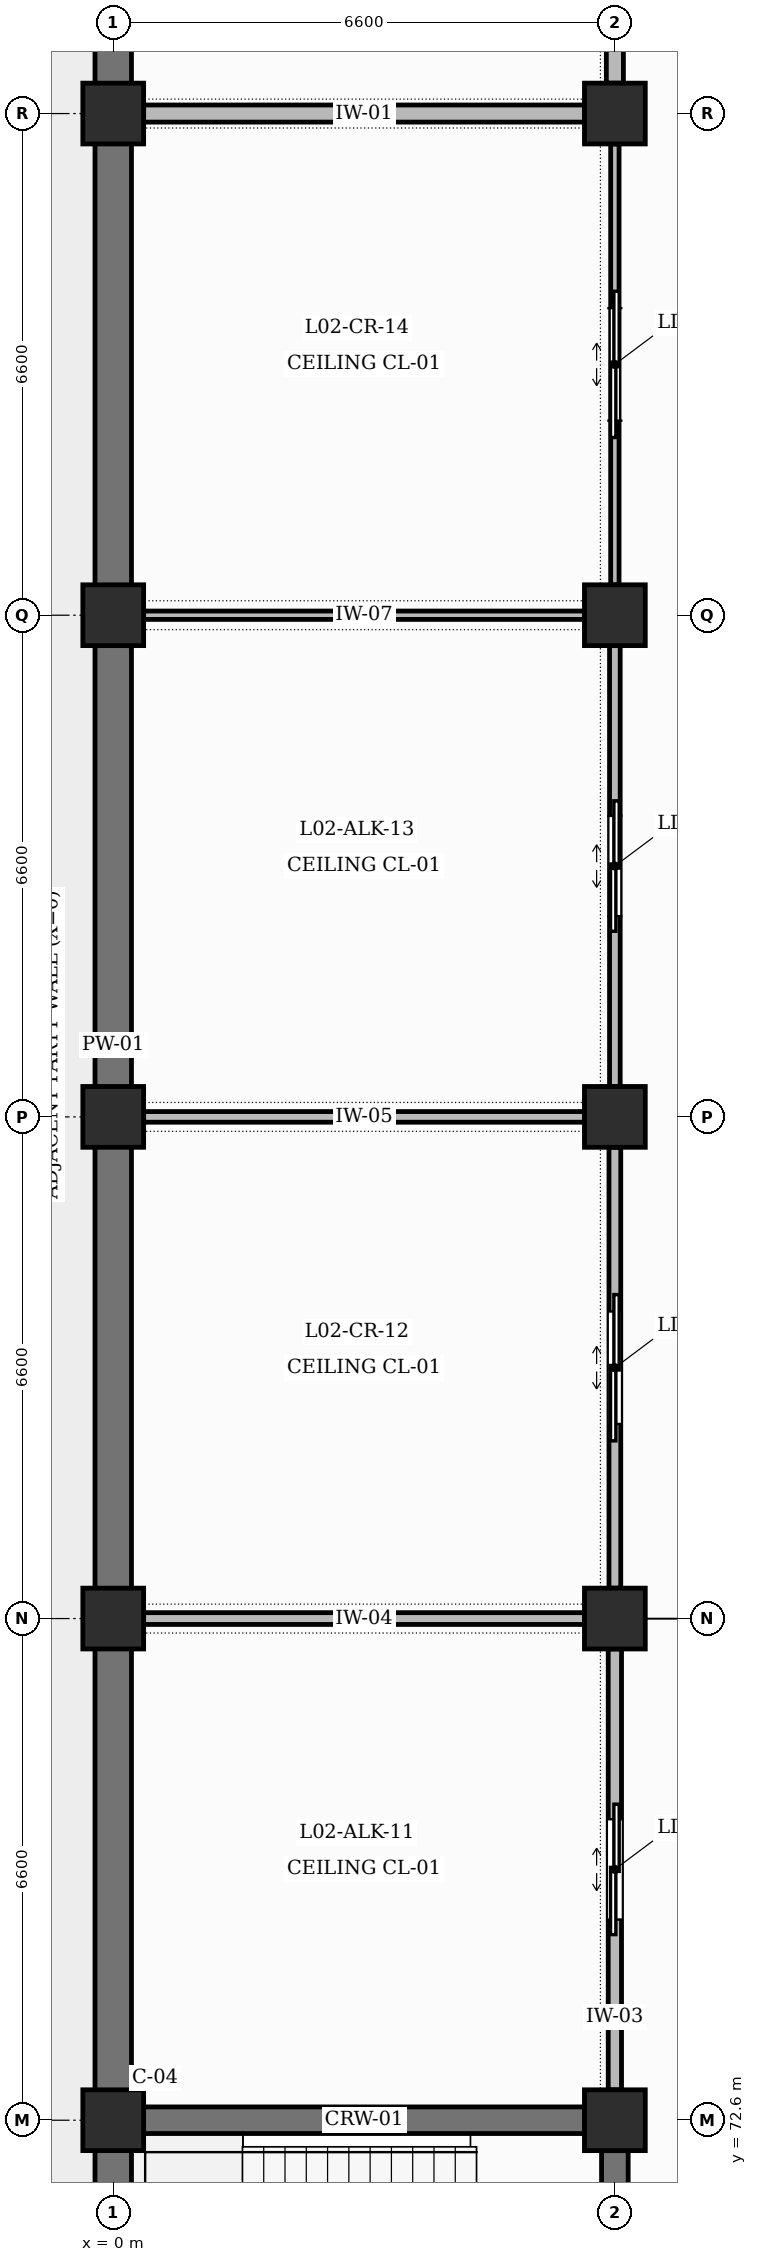
"""IFC4 building model, lengths in metres.
Left out: names, types, materials, properties, quantities, classifications, styles, units other than length and angle.
Written with IfcOpenShell. Run it as: python <this file> out.ifc"""

import sys

from ifc_helpers import new_model, si_unit, direction, frame, frame_2d, origin, origin_2d, place, context, subcontext, project, spatial, rectangle, extrude, element, fill, save


model = new_model("IFC4")
c1 = context("Model", 3, precision=1e-05, world=origin(), true_north=direction((0.0, 1.0)))
c2 = subcontext(c1, "Body", "Model", "MODEL_VIEW")
j1 = project(units=[si_unit("LENGTHUNIT", "METRE"), si_unit("PLANEANGLEUNIT", "RADIAN")], contexts=[c1])
p1 = place(None, origin())
s1 = spatial("IfcSite", under=j1, at=p1, CompositionType="ELEMENT")
p2 = place(p1, origin())
s2 = spatial("IfcBuilding", under=s1, at=p2, CompositionType="ELEMENT")
p3 = place(p2, frame((0.0, 0.0, 10.2)))
s3 = spatial("IfcBuildingStorey", under=s2, at=p3, CompositionType="ELEMENT", Elevation=10.2)
for number, where, z_axis, x_axis in (
    (1, (0.0, 72.6, 0.0), (0.0, 0.0, 1.0), (1.0, 0.0, 0.0)),
    (2, (0.0, 79.2, 0.0), (0.0, 0.0, 1.0), (1.0, 0.0, 0.0)),
    (3, (0.0, 85.8, 0.0), (0.0, 0.0, 1.0), (1.0, 0.0, 0.0)),
    (4, (0.0, 92.4, 0.0), (0.0, 0.0, 1.0), (1.0, 0.0, 0.0)),
    (5, (0.0, 99.0, 0.0), (0.0, 0.0, 1.0), (1.0, 0.0, 0.0)),
    (6, (6.6, 72.6, 0.0), (0.0, 0.0, 1.0), (1.0, 0.0, 0.0)),
    (7, (6.6, 79.2, 0.0), (0.0, 0.0, 1.0), (1.0, 0.0, 0.0)),
    (8, (6.6, 85.8, 0.0), (0.0, 0.0, 1.0), (1.0, 0.0, 0.0)),
    (9, (6.6, 92.4, 0.0), (0.0, 0.0, 1.0), (1.0, 0.0, 0.0)),
    (10, (6.6, 99.0, 0.0), (0.0, 0.0, 1.0), (1.0, 0.0, 0.0)),
):
    element("IfcColumn", number, at=place(p3, frame(where, z_axis=z_axis, x_axis=x_axis)), inside=s3, PredefinedType="COLUMN", context=c2, shape_type="SweptSolid", body=[
        extrude(rectangle(XDim=0.8, YDim=0.8, at=origin_2d()), origin(), (0.0, 0.0, 1.0), 4.2),
    ])
for number, where, z_axis, x_axis in (
    (11, (0.0, 66.4, 0.0), (0.0, 0.0, 1.0), (0.0, 1.0, 0.0)),
    (12, (0.0, 73.0, 0.0), (0.0, 0.0, 1.0), (0.0, 1.0, 0.0)),
):
    element("IfcWall", number, at=place(p3, frame(where, z_axis=z_axis, x_axis=x_axis)), inside=s3, PredefinedType="SOLIDWALL", context=c2, shape_type="SweptSolid", body=[
        extrude(rectangle(XDim=5.8, YDim=0.48, at=frame_2d((2.9, 0.0))), origin(), (0.0, 0.0, 1.0), 3.25),
    ])
p4 = place(p3, frame((0.0, 79.6, 0.0), z_axis=(0.0, 0.0, 1.0), x_axis=(0.0, 1.0, 0.0)))
e13 = element("IfcWall", 13, at=p4, inside=s3, PredefinedType="SOLIDWALL", context=c2, shape_type="SweptSolid", body=[
    extrude(rectangle(XDim=5.8, YDim=0.48, at=frame_2d((2.9, 0.0))), origin(), (0.0, 0.0, 1.0), 3.25),
])
for number, where, z_axis, x_axis in (
    (14, (0.0, 86.2, 0.0), (0.0, 0.0, 1.0), (0.0, 1.0, 0.0)),
    (15, (0.0, 92.8, 0.0), (0.0, 0.0, 1.0), (0.0, 1.0, 0.0)),
    (16, (0.0, 99.4, 0.0), (0.0, 0.0, 1.0), (0.0, 1.0, 0.0)),
):
    element("IfcWall", number, at=place(p3, frame(where, z_axis=z_axis, x_axis=x_axis)), inside=s3, PredefinedType="SOLIDWALL", context=c2, shape_type="SweptSolid", body=[
        extrude(rectangle(XDim=5.8, YDim=0.48, at=frame_2d((2.9, 0.0))), origin(), (0.0, 0.0, 1.0), 3.25),
    ])
p5 = place(p3, frame((0.4, 72.6, 0.0), z_axis=(0.0, 0.0, 1.0), x_axis=(1.0, 0.0, 0.0)))
e17 = element("IfcWall", 17, at=p5, inside=s3, PredefinedType="SHEAR", context=c2, shape_type="SweptSolid", body=[
    extrude(rectangle(XDim=5.8, YDim=0.35, at=frame_2d((2.9, 0.0))), origin(), (0.0, 0.0, 1.0), 3.1),
])
p6 = place(p3, frame((6.6, 66.4, 0.0), z_axis=(0.0, 0.0, 1.0), x_axis=(0.0, 1.0, 0.0)))
e18 = element("IfcWall", 18, at=p6, inside=s3, PredefinedType="SHEAR", context=c2, shape_type="SweptSolid", body=[
    extrude(rectangle(XDim=5.8, YDim=0.35, at=frame_2d((2.9, 0.0))), origin(), (0.0, 0.0, 1.0), 3.1),
])
p7 = place(p6, frame((2.325, 0.0, 0.0)))
e19 = element("IfcOpeningElement", 19, at=p7, cuts=e18, PredefinedType="OPENING", context=c2, shape_type="SweptSolid", body=[
    extrude(rectangle(XDim=1.15, YDim=2.2, at=frame_2d((0.575, 1.1))), frame((0.0, 0.185, 0.0), z_axis=(0.0, -1.0, 0.0), x_axis=(1.0, 0.0, 0.0)), (0.0, 0.0, 1.0), 0.37),
])
p8 = place(p3, frame((6.6, 73.0, 0.0), z_axis=(0.0, 0.0, 1.0), x_axis=(0.0, 1.0, 0.0)))
e20 = element("IfcWall", 20, at=p8, inside=s3, PredefinedType="PARTITIONING", context=c2, shape_type="SweptSolid", body=[
    extrude(rectangle(XDim=5.8, YDim=0.175, at=frame_2d((2.9, 0.0))), origin(), (0.0, 0.0, 1.0), 3.1),
])
p9 = place(p8, frame((2.24, 0.0, 0.0)))
e21 = element("IfcOpeningElement", 21, at=p9, cuts=e20, PredefinedType="OPENING", context=c2, shape_type="SweptSolid", body=[
    extrude(rectangle(XDim=1.32, YDim=2.2, at=frame_2d((0.66, 1.1))), frame((0.0, 0.097, 0.0), z_axis=(0.0, -1.0, 0.0), x_axis=(1.0, 0.0, 0.0)), (0.0, 0.0, 1.0), 0.195),
])
p10 = place(p3, frame((0.4, 79.2, 0.0), z_axis=(0.0, 0.0, 1.0), x_axis=(1.0, 0.0, 0.0)))
e22 = element("IfcWall", 22, at=p10, inside=s3, PredefinedType="PARTITIONING", context=c2, shape_type="SweptSolid", body=[
    extrude(rectangle(XDim=5.8, YDim=0.155, at=frame_2d((2.9, 0.0))), origin(), (0.0, 0.0, 1.0), 3.0),
])
p11 = place(p3, frame((6.6, 79.6, 0.0), z_axis=(0.0, 0.0, 1.0), x_axis=(0.0, 1.0, 0.0)))
e23 = element("IfcWall", 23, at=p11, inside=s3, PredefinedType="PARTITIONING", context=c2, shape_type="SweptSolid", body=[
    extrude(rectangle(XDim=5.8, YDim=0.155, at=frame_2d((2.9, 0.0))), origin(), (0.0, 0.0, 1.0), 3.1),
])
p12 = place(p11, frame((2.16, 0.0, 0.0)))
e24 = element("IfcOpeningElement", 24, at=p12, cuts=e23, PredefinedType="OPENING", context=c2, shape_type="SweptSolid", body=[
    extrude(rectangle(XDim=1.48, YDim=2.25, at=frame_2d((0.74, 1.125))), frame((0.0, 0.087, 0.0), z_axis=(0.0, -1.0, 0.0), x_axis=(1.0, 0.0, 0.0)), (0.0, 0.0, 1.0), 0.175),
])
p13 = place(p3, frame((0.4, 85.8, 0.0), z_axis=(0.0, 0.0, 1.0), x_axis=(1.0, 0.0, 0.0)))
e25 = element("IfcWall", 25, at=p13, inside=s3, PredefinedType="PARTITIONING", context=c2, shape_type="SweptSolid", body=[
    extrude(rectangle(XDim=5.8, YDim=0.14, at=frame_2d((2.9, 0.0))), origin(), (0.0, 0.0, 1.0), 3.1),
])
p14 = place(p3, frame((6.6, 86.2, 0.0), z_axis=(0.0, 0.0, 1.0), x_axis=(0.0, 1.0, 0.0)))
e26 = element("IfcWall", 26, at=p14, inside=s3, PredefinedType="PARTITIONING", context=c2, shape_type="SweptSolid", body=[
    extrude(rectangle(XDim=5.8, YDim=0.14, at=frame_2d((2.9, 0.0))), origin(), (0.0, 0.0, 1.0), 3.1),
])
p15 = place(p14, frame((2.24, 0.0, 0.0)))
e27 = element("IfcOpeningElement", 27, at=p15, cuts=e26, PredefinedType="OPENING", context=c2, shape_type="SweptSolid", body=[
    extrude(rectangle(XDim=1.32, YDim=2.2, at=frame_2d((0.66, 1.1))), frame((0.0, 0.08, 0.0), z_axis=(0.0, -1.0, 0.0), x_axis=(1.0, 0.0, 0.0)), (0.0, 0.0, 1.0), 0.16),
])
p16 = place(p3, frame((0.4, 92.4, 0.0), z_axis=(0.0, 0.0, 1.0), x_axis=(1.0, 0.0, 0.0)))
e28 = element("IfcWall", 28, at=p16, inside=s3, PredefinedType="PARTITIONING", context=c2, shape_type="SweptSolid", body=[
    extrude(rectangle(XDim=5.8, YDim=0.11, at=frame_2d((2.9, 0.0))), origin(), (0.0, 0.0, 1.0), 3.0),
])
p17 = place(p3, frame((6.6, 92.8, 0.0), z_axis=(0.0, 0.0, 1.0), x_axis=(0.0, 1.0, 0.0)))
e29 = element("IfcWall", 29, at=p17, inside=s3, PredefinedType="PARTITIONING", context=c2, shape_type="SweptSolid", body=[
    extrude(rectangle(XDim=5.8, YDim=0.11, at=frame_2d((2.9, 0.0))), origin(), (0.0, 0.0, 1.0), 3.1),
])
p18 = place(p17, frame((2.16, 0.0, 0.0)))
e30 = element("IfcOpeningElement", 30, at=p18, cuts=e29, PredefinedType="OPENING", context=c2, shape_type="SweptSolid", body=[
    extrude(rectangle(XDim=1.48, YDim=2.25, at=frame_2d((0.74, 1.125))), frame((0.0, 0.065, 0.0), z_axis=(0.0, -1.0, 0.0), x_axis=(1.0, 0.0, 0.0)), (0.0, 0.0, 1.0), 0.13),
])
p19 = place(p3, frame((0.4, 99.0, 0.0), z_axis=(0.0, 0.0, 1.0), x_axis=(1.0, 0.0, 0.0)))
e31 = element("IfcWall", 31, at=p19, inside=s3, PredefinedType="PARTITIONING", context=c2, shape_type="SweptSolid", body=[
    extrude(rectangle(XDim=5.8, YDim=0.225, at=frame_2d((2.9, 0.0))), origin(), (0.0, 0.0, 1.0), 3.1),
])
p20 = place(p3, frame((6.6, 99.4, 0.0), z_axis=(0.0, 0.0, 1.0), x_axis=(0.0, 1.0, 0.0)))
e32 = element("IfcWall", 32, at=p20, inside=s3, PredefinedType="PARTITIONING", context=c2, shape_type="SweptSolid", body=[
    extrude(rectangle(XDim=5.8, YDim=0.225, at=frame_2d((2.9, 0.0))), origin(), (0.0, 0.0, 1.0), 3.1),
])
p21 = place(p20, frame((2.24, 0.0, 0.0)))
e33 = element("IfcOpeningElement", 33, at=p21, cuts=e32, PredefinedType="OPENING", context=c2, shape_type="SweptSolid", body=[
    extrude(rectangle(XDim=1.32, YDim=2.2, at=frame_2d((0.66, 1.1))), frame((0.0, 0.123, 0.0), z_axis=(0.0, -1.0, 0.0), x_axis=(1.0, 0.0, 0.0)), (0.0, 0.0, 1.0), 0.245),
])
p22 = place(p9, origin())
e34 = element("IfcDoor", 34, at=p22, inside=s3, OperationType="DOUBLE_DOOR_SLIDING", PredefinedType="USERDEFINED", context=c2, shape_type="SweptSolid", body=[
    extrude(rectangle(XDim=1.32, YDim=2.2, at=frame_2d((0.66, 1.1))), frame((0.0, 0.025, 0.0), z_axis=(0.0, -1.0, 0.0), x_axis=(1.0, 0.0, 0.0)), (0.0, 0.0, 1.0), 0.05),
])
fill(e21, e34)
p23 = place(p12, origin())
e35 = element("IfcDoor", 35, at=p23, inside=s3, OperationType="DOUBLE_DOOR_SLIDING", PredefinedType="USERDEFINED", context=c2, shape_type="SweptSolid", body=[
    extrude(rectangle(XDim=1.48, YDim=2.25, at=frame_2d((0.74, 1.125))), frame((0.0, 0.025, 0.0), z_axis=(0.0, -1.0, 0.0), x_axis=(1.0, 0.0, 0.0)), (0.0, 0.0, 1.0), 0.05),
])
fill(e24, e35)
p24 = place(p15, origin())
e36 = element("IfcDoor", 36, at=p24, inside=s3, OperationType="DOUBLE_DOOR_SLIDING", PredefinedType="USERDEFINED", context=c2, shape_type="SweptSolid", body=[
    extrude(rectangle(XDim=1.32, YDim=2.2, at=frame_2d((0.66, 1.1))), frame((0.0, 0.025, 0.0), z_axis=(0.0, -1.0, 0.0), x_axis=(1.0, 0.0, 0.0)), (0.0, 0.0, 1.0), 0.05),
])
fill(e27, e36)
p25 = place(p18, origin())
e37 = element("IfcDoor", 37, at=p25, inside=s3, OperationType="DOUBLE_DOOR_SLIDING", PredefinedType="USERDEFINED", context=c2, shape_type="SweptSolid", body=[
    extrude(rectangle(XDim=1.48, YDim=2.25, at=frame_2d((0.74, 1.125))), frame((0.0, 0.025, 0.0), z_axis=(0.0, -1.0, 0.0), x_axis=(1.0, 0.0, 0.0)), (0.0, 0.0, 1.0), 0.05),
])
fill(e30, e37)
save(model, sys.argv[1])
